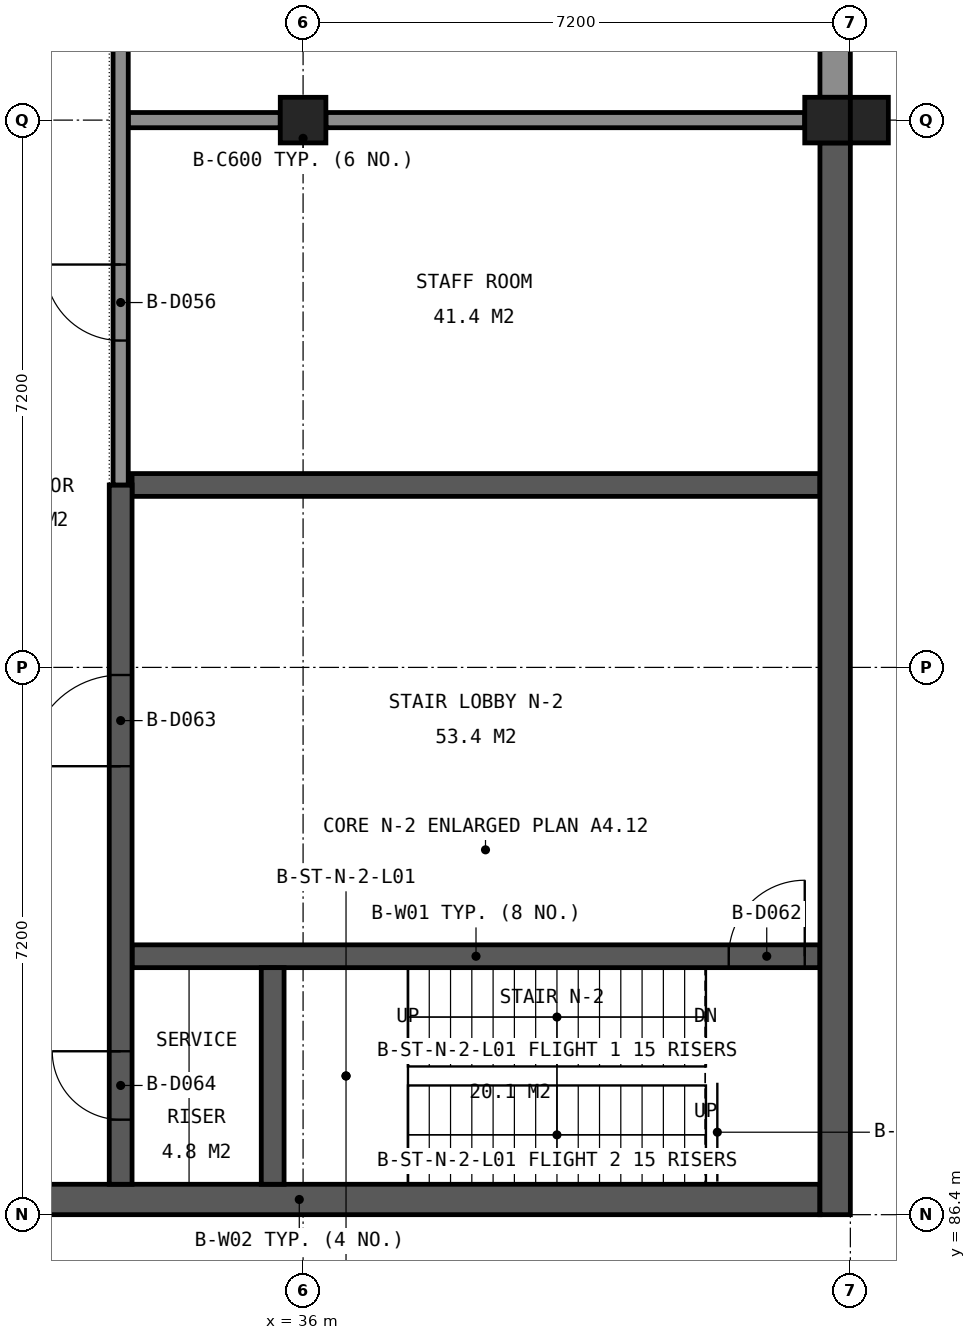
"""IFC4 building model, lengths in metres.
Left out: names, types, materials, properties, quantities, classifications, styles, units other than length and angle.
Written with IfcOpenShell. Run it as: python <this file> out.ifc"""

import sys

from ifc_helpers import new_model, si_unit, direction, frame, frame_2d, origin, origin_2d, place, context, subcontext, project, spatial, rectangle, extrude, element, fill, save


model = new_model("IFC4")
c1 = context("Model", 3, precision=1e-05, world=origin(), true_north=direction((0.0, 1.0)))
c2 = subcontext(c1, "Body", "Model", "MODEL_VIEW")
j1 = project(units=[si_unit("LENGTHUNIT", "METRE"), si_unit("PLANEANGLEUNIT", "RADIAN")], contexts=[c1])
p1 = place(None, origin())
s1 = spatial("IfcSite", under=j1, at=p1, CompositionType="ELEMENT")
p2 = place(p1, origin())
s2 = spatial("IfcBuilding", under=s1, at=p2, CompositionType="ELEMENT")
p3 = place(p2, frame((0.0, 0.0, 9.6)))
s3 = spatial("IfcBuildingStorey", under=s2, at=p3, CompositionType="ELEMENT", Elevation=9.6)
for number, where, z_axis, x_axis in (
    (1, (36.0, 100.8, 0.0), (0.0, 0.0, 1.0), (1.0, 0.0, 0.0)),
    (2, (42.9, 100.8, 0.0), (0.0, 0.0, 1.0), (1.0, 0.0, 0.0)),
):
    element("IfcColumn", number, at=place(p3, frame(where, z_axis=z_axis, x_axis=x_axis)), inside=s3, PredefinedType="COLUMN", context=c2, shape_type="SweptSolid", body=[
        extrude(rectangle(XDim=0.6, YDim=0.6, at=origin_2d()), origin(), (0.0, 0.0, 1.0), 4.8),
    ])
p4 = place(p3, frame((29.1, 86.6, 0.0), z_axis=(0.0, 0.0, 1.0), x_axis=(1.0, 0.0, 0.0)))
e3 = element("IfcWall", 3, at=p4, inside=s3, PredefinedType="SHEAR", context=c2, shape_type="SweptSolid", body=[
    extrude(rectangle(XDim=13.7, YDim=0.4, at=frame_2d((6.85, 0.0))), origin(), (0.0, 0.0, 1.0), 4.55),
])
p5 = place(p3, frame((33.75, 89.8, 0.0), z_axis=(0.0, 0.0, 1.0), x_axis=(1.0, 0.0, 0.0)))
e4 = element("IfcWall", 4, at=p5, inside=s3, PredefinedType="SHEAR", context=c2, shape_type="SweptSolid", body=[
    extrude(rectangle(XDim=9.05, YDim=0.3, at=frame_2d((4.525, 0.0))), origin(), (0.0, 0.0, 1.0), 4.55),
])
p6 = place(p5, frame((7.85, 0.0, 0.0)))
e5 = element("IfcOpeningElement", 5, at=p6, cuts=e4, PredefinedType="OPENING", context=c2, shape_type="SweptSolid", body=[
    extrude(rectangle(XDim=1.0, YDim=2.1, at=frame_2d((0.5, 1.05))), frame((0.0, 0.16, 0.0), z_axis=(0.0, -1.0, 0.0), x_axis=(1.0, 0.0, 0.0)), (0.0, 0.0, 1.0), 0.32),
])
p7 = place(p3, frame((33.75, 96.0, 0.0), z_axis=(0.0, 0.0, 1.0), x_axis=(1.0, 0.0, 0.0)))
e6 = element("IfcWall", 6, at=p7, inside=s3, PredefinedType="SHEAR", context=c2, shape_type="SweptSolid", body=[
    extrude(rectangle(XDim=9.05, YDim=0.3, at=frame_2d((4.525, 0.0))), origin(), (0.0, 0.0, 1.0), 4.55),
])
p8 = place(p3, frame((33.6, 86.8, 0.0), z_axis=(0.0, 0.0, 1.0), x_axis=(0.0, 1.0, 0.0)))
e7 = element("IfcWall", 7, at=p8, inside=s3, PredefinedType="SHEAR", context=c2, shape_type="SweptSolid", body=[
    extrude(rectangle(XDim=9.2, YDim=0.3, at=frame_2d((4.6, 0.0))), origin(), (0.0, 0.0, 1.0), 4.55),
])
p9 = place(p8, frame((5.5, 0.0, 0.0)))
e8 = element("IfcOpeningElement", 8, at=p9, cuts=e7, PredefinedType="OPENING", context=c2, shape_type="SweptSolid", body=[
    extrude(rectangle(XDim=1.2, YDim=2.1, at=frame_2d((0.6, 1.05))), frame((0.0, 0.16, 0.0), z_axis=(0.0, -1.0, 0.0), x_axis=(1.0, 0.0, 0.0)), (0.0, 0.0, 1.0), 0.32),
])
p10 = place(p8, frame((0.85, 0.0, 0.0)))
e9 = element("IfcOpeningElement", 9, at=p10, cuts=e7, PredefinedType="OPENING", context=c2, shape_type="SweptSolid", body=[
    extrude(rectangle(XDim=0.9, YDim=2.1, at=frame_2d((0.45, 1.05))), frame((0.0, 0.16, 0.0), z_axis=(0.0, -1.0, 0.0), x_axis=(1.0, 0.0, 0.0)), (0.0, 0.0, 1.0), 0.32),
])
p11 = place(p3, frame((35.6, 86.8, 0.0), z_axis=(0.0, 0.0, 1.0), x_axis=(0.0, 1.0, 0.0)))
e10 = element("IfcWall", 10, at=p11, inside=s3, PredefinedType="SHEAR", context=c2, shape_type="SweptSolid", body=[
    extrude(rectangle(XDim=2.85, YDim=0.3, at=frame_2d((1.425, 0.0))), origin(), (0.0, 0.0, 1.0), 4.55),
])
p12 = place(p3, frame((43.0, 86.4, 0.0), z_axis=(0.0, 0.0, 1.0), x_axis=(0.0, 1.0, 0.0)))
e11 = element("IfcWall", 11, at=p12, inside=s3, PredefinedType="SHEAR", context=c2, shape_type="SweptSolid", body=[
    extrude(rectangle(XDim=14.1, YDim=0.4, at=frame_2d((7.05, 0.0))), origin(), (0.0, 0.0, 1.0), 4.55),
])
p13 = place(p3, frame((43.0, 101.1, 0.0), z_axis=(0.0, 0.0, 1.0), x_axis=(0.0, 1.0, 0.0)))
e12 = element("IfcWall", 12, at=p13, inside=s3, PredefinedType="SOLIDWALL", context=c2, shape_type="SweptSolid", body=[
    extrude(rectangle(XDim=6.6, YDim=0.4, at=frame_2d((3.3, 0.0))), origin(), (0.0, 0.0, 1.0), 3.95),
])
p14 = place(p13, frame((1.275, 0.0, 0.9)))
e13 = element("IfcOpeningElement", 13, at=p14, cuts=e12, PredefinedType="OPENING", context=c2, shape_type="SweptSolid", body=[
    extrude(rectangle(XDim=1.2, YDim=2.4, at=frame_2d((0.6, 1.2))), frame((0.0, 0.21, 0.0), z_axis=(0.0, -1.0, 0.0), x_axis=(1.0, 0.0, 0.0)), (0.0, 0.0, 1.0), 0.42),
])
p15 = place(p13, frame((4.125, 0.0, 0.9)))
e14 = element("IfcOpeningElement", 14, at=p15, cuts=e12, PredefinedType="OPENING", context=c2, shape_type="SweptSolid", body=[
    extrude(rectangle(XDim=1.2, YDim=2.4, at=frame_2d((0.6, 1.2))), frame((0.0, 0.21, 0.0), z_axis=(0.0, -1.0, 0.0), x_axis=(1.0, 0.0, 0.0)), (0.0, 0.0, 1.0), 0.42),
])
p16 = place(p3, frame((43.45, 100.8, 0.0), z_axis=(0.0, 0.0, 1.0), x_axis=(1.0, 0.0, 0.0)))
e15 = element("IfcColumn", 15, at=p16, inside=s3, PredefinedType="COLUMN", context=c2, shape_type="SweptSolid", body=[
    extrude(rectangle(XDim=0.5, YDim=0.6, at=origin_2d()), origin(), (0.0, 0.0, 1.0), 4.8),
])
p17 = place(p3, frame((43.275, 86.4, -0.15), z_axis=(0.0, 0.0, 1.0), x_axis=(0.0, 1.0, 0.0)))
e16 = element("IfcWall", 16, at=p17, inside=s3, PredefinedType="SOLIDWALL", context=c2, shape_type="SweptSolid", body=[
    extrude(rectangle(XDim=14.1, YDim=0.15, at=frame_2d((7.05, 0.0))), origin(), (0.0, 0.0, 1.0), 0.3),
])
p18 = place(p3, frame((43.275, 101.1, -0.15), z_axis=(0.0, 0.0, 1.0), x_axis=(0.0, 1.0, 0.0)))
e17 = element("IfcWall", 17, at=p18, inside=s3, PredefinedType="SOLIDWALL", context=c2, shape_type="SweptSolid", body=[
    extrude(rectangle(XDim=6.6, YDim=0.15, at=frame_2d((3.3, 0.0))), origin(), (0.0, 0.0, 1.0), 0.3),
])
p19 = place(p3, frame((33.7, 100.8, 0.0), z_axis=(0.0, 0.0, 1.0), x_axis=(1.0, 0.0, 0.0)))
e18 = element("IfcWall", 18, at=p19, inside=s3, PredefinedType="PARTITIONING", context=c2, shape_type="SweptSolid", body=[
    extrude(rectangle(XDim=2.0, YDim=0.2, at=frame_2d((1.0, 0.0))), origin(), (0.0, 0.0, 1.0), 3.95),
])
p20 = place(p3, frame((36.3, 100.8, 0.0), z_axis=(0.0, 0.0, 1.0), x_axis=(1.0, 0.0, 0.0)))
e19 = element("IfcWall", 19, at=p20, inside=s3, PredefinedType="PARTITIONING", context=c2, shape_type="SweptSolid", body=[
    extrude(rectangle(XDim=6.3, YDim=0.2, at=frame_2d((3.15, 0.0))), origin(), (0.0, 0.0, 1.0), 3.95),
])
p21 = place(p3, frame((33.6, 96.0, 0.0), z_axis=(0.0, 0.0, 1.0), x_axis=(0.0, 1.0, 0.0)))
e20 = element("IfcWall", 20, at=p21, inside=s3, PredefinedType="PARTITIONING", context=c2, shape_type="SweptSolid", body=[
    extrude(rectangle(XDim=24.0, YDim=0.2, at=frame_2d((12.0, 0.0))), origin(), (0.0, 0.0, 1.0), 3.95),
])
p22 = place(p21, frame((17.1, 0.0, 0.0)))
e21 = element("IfcOpeningElement", 21, at=p22, cuts=e20, PredefinedType="OPENING", context=c2, shape_type="SweptSolid", body=[
    extrude(rectangle(XDim=1.8, YDim=2.1, at=frame_2d((0.9, 1.05))), frame((0.0, 0.11, 0.0), z_axis=(0.0, -1.0, 0.0), x_axis=(1.0, 0.0, 0.0)), (0.0, 0.0, 1.0), 0.22),
])
p23 = place(p21, frame((7.9, 0.0, 0.0)))
e22 = element("IfcOpeningElement", 22, at=p23, cuts=e20, PredefinedType="OPENING", context=c2, shape_type="SweptSolid", body=[
    extrude(rectangle(XDim=1.0, YDim=2.1, at=frame_2d((0.5, 1.05))), frame((0.0, 0.11, 0.0), z_axis=(0.0, -1.0, 0.0), x_axis=(1.0, 0.0, 0.0)), (0.0, 0.0, 1.0), 0.22),
])
p24 = place(p21, frame((1.9, 0.0, 0.0)))
e23 = element("IfcOpeningElement", 23, at=p24, cuts=e20, PredefinedType="OPENING", context=c2, shape_type="SweptSolid", body=[
    extrude(rectangle(XDim=1.0, YDim=2.1, at=frame_2d((0.5, 1.05))), frame((0.0, 0.11, 0.0), z_axis=(0.0, -1.0, 0.0), x_axis=(1.0, 0.0, 0.0)), (0.0, 0.0, 1.0), 0.22),
])
p25 = place(p24, origin())
e24 = element("IfcDoor", 24, at=p25, inside=s3, OperationType="SINGLE_SWING_RIGHT", PredefinedType="DOOR", context=c2, shape_type="SweptSolid", body=[
    extrude(rectangle(XDim=1.0, YDim=2.1, at=frame_2d((0.5, 1.05))), frame((0.0, 0.025, 0.0), z_axis=(0.0, -1.0, 0.0), x_axis=(1.0, 0.0, 0.0)), (0.0, 0.0, 1.0), 0.05),
])
fill(e23, e24)
p26 = place(p6, origin())
e25 = element("IfcDoor", 25, at=p26, inside=s3, OperationType="SINGLE_SWING_RIGHT", PredefinedType="DOOR", context=c2, shape_type="SweptSolid", body=[
    extrude(rectangle(XDim=1.0, YDim=2.1, at=frame_2d((0.5, 1.05))), frame((0.0, 0.025, 0.0), z_axis=(0.0, -1.0, 0.0), x_axis=(1.0, 0.0, 0.0)), (0.0, 0.0, 1.0), 0.05),
])
fill(e5, e25)
p27 = place(p9, origin())
e26 = element("IfcDoor", 26, at=p27, inside=s3, OperationType="SINGLE_SWING_LEFT", PredefinedType="DOOR", context=c2, shape_type="SweptSolid", body=[
    extrude(rectangle(XDim=1.2, YDim=2.1, at=frame_2d((0.6, 1.05))), frame((0.0, 0.025, 0.0), z_axis=(0.0, -1.0, 0.0), x_axis=(1.0, 0.0, 0.0)), (0.0, 0.0, 1.0), 0.05),
])
fill(e8, e26)
p28 = place(p10, origin())
e27 = element("IfcDoor", 27, at=p28, inside=s3, OperationType="SINGLE_SWING_RIGHT", PredefinedType="DOOR", context=c2, shape_type="SweptSolid", body=[
    extrude(rectangle(XDim=0.9, YDim=2.1, at=frame_2d((0.45, 1.05))), frame((0.0, 0.025, 0.0), z_axis=(0.0, -1.0, 0.0), x_axis=(1.0, 0.0, 0.0)), (0.0, 0.0, 1.0), 0.05),
])
fill(e9, e27)
save(model, sys.argv[1])
